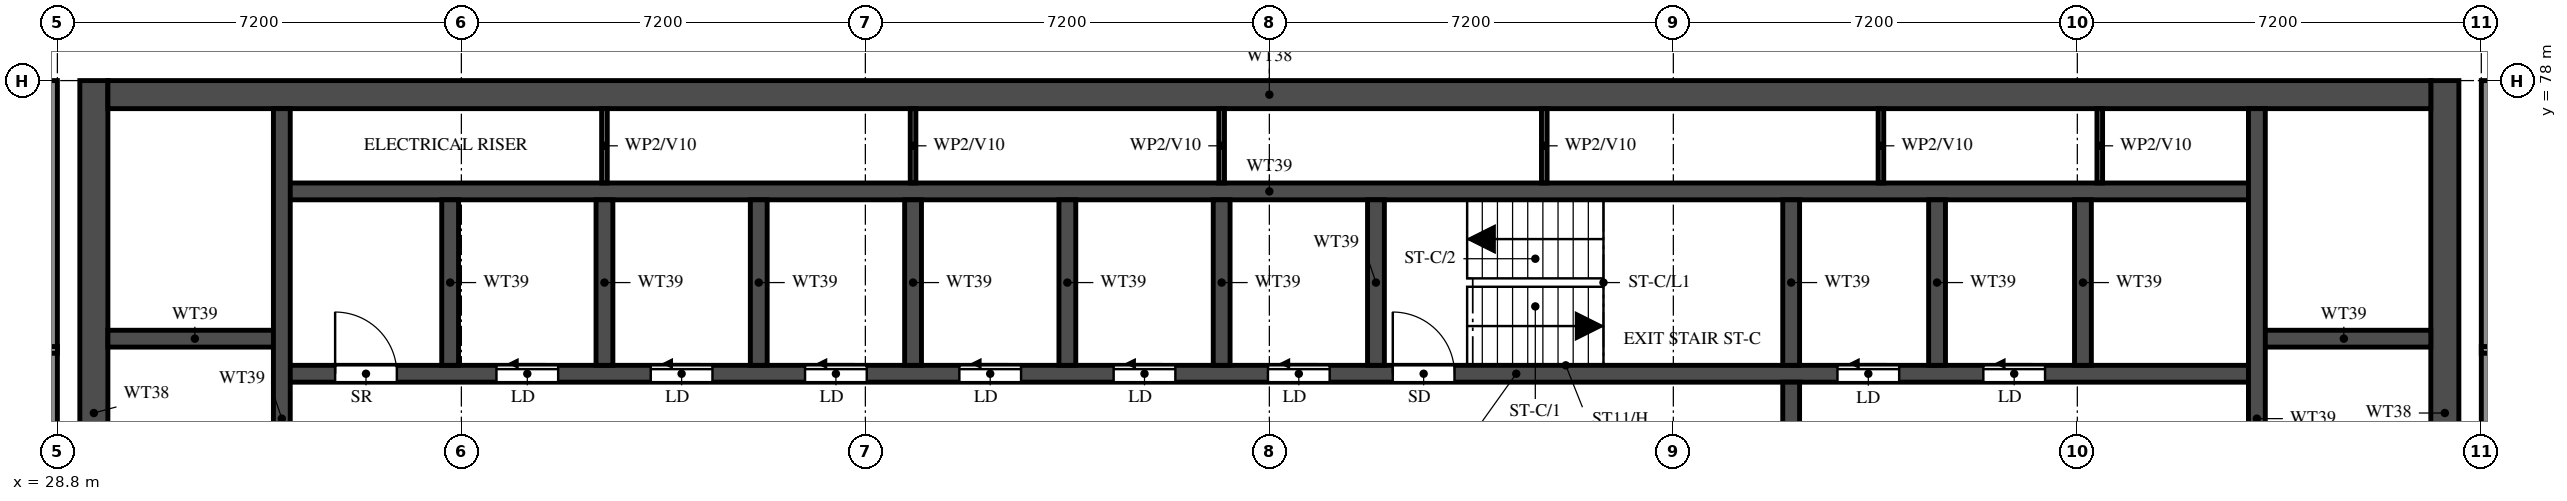
"""IFC4 building model, lengths in metres.
Left out: names, types, materials, properties, quantities, classifications, styles, units other than length and angle.
Written with IfcOpenShell. Run it as: python <this file> out.ifc"""

import sys

from ifc_helpers import new_model, si_unit, direction, frame, frame_2d, origin, place, context, subcontext, project, spatial, rectangle, extrude, element, fill, save


model = new_model("IFC4")
c1 = context("Model", 3, precision=1e-05, world=origin(), true_north=direction((0.0, 1.0)))
c2 = subcontext(c1, "Body", "Model", "MODEL_VIEW")
j1 = project(units=[si_unit("LENGTHUNIT", "METRE"), si_unit("PLANEANGLEUNIT", "RADIAN")], contexts=[c1])
p1 = place(None, origin())
s1 = spatial("IfcSite", under=j1, at=p1, CompositionType="ELEMENT")
p2 = place(p1, origin())
s2 = spatial("IfcBuilding", under=s1, at=p2, CompositionType="ELEMENT")
p3 = place(p2, frame((0.0, 0.0, 267.5)))
s3 = spatial("IfcBuildingStorey", under=s2, at=p3, CompositionType="ELEMENT", Elevation=267.5)
for number, where, z_axis, x_axis in (
    (1, (29.45, 66.15, 0.0), (0.0, 0.0, 1.0), (0.0, 1.0, 0.0)),
    (2, (71.35, 66.15, 0.0), (0.0, 0.0, 1.0), (0.0, 1.0, 0.0)),
):
    element("IfcWall", number, at=place(p3, frame(where, z_axis=z_axis, x_axis=x_axis)), inside=s3, PredefinedType="SHEAR", context=c2, shape_type="SweptSolid", body=[
        extrude(rectangle(XDim=11.85, YDim=0.5, at=frame_2d((5.925, 0.0))), origin(), (0.0, 0.0, 1.0), 3.099),
    ])
p4 = place(p3, frame((29.7, 77.75, 0.0), z_axis=(0.0, 0.0, 1.0), x_axis=(1.0, 0.0, 0.0)))
e3 = element("IfcWall", 3, at=p4, inside=s3, PredefinedType="SHEAR", context=c2, shape_type="SweptSolid", body=[
    extrude(rectangle(XDim=41.4, YDim=0.5, at=frame_2d((20.7, 0.0))), origin(), (0.0, 0.0, 1.0), 3.099),
])
p5 = place(p3, frame((32.8, 72.775, 0.0), z_axis=(0.0, 0.0, 1.0), x_axis=(1.0, 0.0, 0.0)))
e4 = element("IfcWall", 4, at=p5, inside=s3, PredefinedType="SHEAR", context=c2, shape_type="SweptSolid", body=[
    extrude(rectangle(XDim=35.2, YDim=0.3, at=frame_2d((17.6, 0.0))), origin(), (0.0, 0.0, 1.0), 3.099),
])
p6 = place(p5, frame((19.8, 0.0, 0.0)))
e5 = element("IfcOpeningElement", 5, at=p6, cuts=e4, PredefinedType="OPENING", context=c2, shape_type="SweptSolid", body=[
    extrude(rectangle(XDim=1.1, YDim=2.1, at=frame_2d((0.55, 1.05))), frame((0.0, 0.16, 0.0), z_axis=(0.0, -1.0, 0.0), x_axis=(1.0, 0.0, 0.0)), (0.0, 0.0, 1.0), 0.32),
])
p7 = place(p5, frame((27.725, 0.0, 0.0)))
e6 = element("IfcOpeningElement", 6, at=p7, cuts=e4, PredefinedType="OPENING", context=c2, shape_type="SweptSolid", body=[
    extrude(rectangle(XDim=1.1, YDim=2.1, at=frame_2d((0.55, 1.05))), frame((0.0, 0.16, 0.0), z_axis=(0.0, -1.0, 0.0), x_axis=(1.0, 0.0, 0.0)), (0.0, 0.0, 1.0), 0.32),
])
p8 = place(p5, frame((30.325, 0.0, 0.0)))
e7 = element("IfcOpeningElement", 7, at=p8, cuts=e4, PredefinedType="OPENING", context=c2, shape_type="SweptSolid", body=[
    extrude(rectangle(XDim=1.1, YDim=2.1, at=frame_2d((0.55, 1.05))), frame((0.0, 0.16, 0.0), z_axis=(0.0, -1.0, 0.0), x_axis=(1.0, 0.0, 0.0)), (0.0, 0.0, 1.0), 0.32),
])
p9 = place(p5, frame((3.825, 0.0, 0.0)))
e8 = element("IfcOpeningElement", 8, at=p9, cuts=e4, PredefinedType="OPENING", context=c2, shape_type="SweptSolid", body=[
    extrude(rectangle(XDim=1.1, YDim=2.1, at=frame_2d((0.55, 1.05))), frame((0.0, 0.16, 0.0), z_axis=(0.0, -1.0, 0.0), x_axis=(1.0, 0.0, 0.0)), (0.0, 0.0, 1.0), 0.32),
])
p10 = place(p5, frame((6.575, 0.0, 0.0)))
e9 = element("IfcOpeningElement", 9, at=p10, cuts=e4, PredefinedType="OPENING", context=c2, shape_type="SweptSolid", body=[
    extrude(rectangle(XDim=1.1, YDim=2.1, at=frame_2d((0.55, 1.05))), frame((0.0, 0.16, 0.0), z_axis=(0.0, -1.0, 0.0), x_axis=(1.0, 0.0, 0.0)), (0.0, 0.0, 1.0), 0.32),
])
p11 = place(p5, frame((9.325, 0.0, 0.0)))
e10 = element("IfcOpeningElement", 10, at=p11, cuts=e4, PredefinedType="OPENING", context=c2, shape_type="SweptSolid", body=[
    extrude(rectangle(XDim=1.1, YDim=2.1, at=frame_2d((0.55, 1.05))), frame((0.0, 0.16, 0.0), z_axis=(0.0, -1.0, 0.0), x_axis=(1.0, 0.0, 0.0)), (0.0, 0.0, 1.0), 0.32),
])
p12 = place(p5, frame((12.075, 0.0, 0.0)))
e11 = element("IfcOpeningElement", 11, at=p12, cuts=e4, PredefinedType="OPENING", context=c2, shape_type="SweptSolid", body=[
    extrude(rectangle(XDim=1.1, YDim=2.1, at=frame_2d((0.55, 1.05))), frame((0.0, 0.16, 0.0), z_axis=(0.0, -1.0, 0.0), x_axis=(1.0, 0.0, 0.0)), (0.0, 0.0, 1.0), 0.32),
])
p13 = place(p5, frame((14.825, 0.0, 0.0)))
e12 = element("IfcOpeningElement", 12, at=p13, cuts=e4, PredefinedType="OPENING", context=c2, shape_type="SweptSolid", body=[
    extrude(rectangle(XDim=1.1, YDim=2.1, at=frame_2d((0.55, 1.05))), frame((0.0, 0.16, 0.0), z_axis=(0.0, -1.0, 0.0), x_axis=(1.0, 0.0, 0.0)), (0.0, 0.0, 1.0), 0.32),
])
p14 = place(p5, frame((17.575, 0.0, 0.0)))
e13 = element("IfcOpeningElement", 13, at=p14, cuts=e4, PredefinedType="OPENING", context=c2, shape_type="SweptSolid", body=[
    extrude(rectangle(XDim=1.1, YDim=2.1, at=frame_2d((0.55, 1.05))), frame((0.0, 0.16, 0.0), z_axis=(0.0, -1.0, 0.0), x_axis=(1.0, 0.0, 0.0)), (0.0, 0.0, 1.0), 0.32),
])
p15 = place(p5, frame((0.95, 0.0, 0.0)))
e14 = element("IfcOpeningElement", 14, at=p15, cuts=e4, PredefinedType="OPENING", context=c2, shape_type="SweptSolid", body=[
    extrude(rectangle(XDim=1.1, YDim=2.1, at=frame_2d((0.55, 1.05))), frame((0.0, 0.16, 0.0), z_axis=(0.0, -1.0, 0.0), x_axis=(1.0, 0.0, 0.0)), (0.0, 0.0, 1.0), 0.32),
])
p16 = place(p3, frame((32.8, 76.025, 0.0), z_axis=(0.0, 0.0, 1.0), x_axis=(1.0, 0.0, 0.0)))
e15 = element("IfcWall", 15, at=p16, inside=s3, PredefinedType="SHEAR", context=c2, shape_type="SweptSolid", body=[
    extrude(rectangle(XDim=35.2, YDim=0.3, at=frame_2d((17.6, 0.0))), origin(), (0.0, 0.0, 1.0), 3.099),
])
for number, where, z_axis, x_axis in (
    (16, (29.7, 73.4, 0.0), (0.0, 0.0, 1.0), (1.0, 0.0, 0.0)),
    (17, (68.0, 73.4, 0.0), (0.0, 0.0, 1.0), (1.0, 0.0, 0.0)),
):
    element("IfcWall", number, at=place(p3, frame(where, z_axis=z_axis, x_axis=x_axis)), inside=s3, PredefinedType="SHEAR", context=c2, shape_type="SweptSolid", body=[
        extrude(rectangle(XDim=3.1, YDim=0.3, at=frame_2d((1.55, 0.0))), origin(), (0.0, 0.0, 1.0), 3.099),
    ])
p17 = place(p3, frame((32.8, 66.45, 0.0), z_axis=(0.0, 0.0, 1.0), x_axis=(0.0, 1.0, 0.0)))
e18 = element("IfcWall", 18, at=p17, inside=s3, PredefinedType="SHEAR", context=c2, shape_type="SweptSolid", body=[
    extrude(rectangle(XDim=11.05, YDim=0.3, at=frame_2d((5.525, 0.0))), origin(), (0.0, 0.0, 1.0), 3.099),
])
p18 = place(p3, frame((68.0, 66.45, 0.0), z_axis=(0.0, 0.0, 1.0), x_axis=(0.0, 1.0, 0.0)))
e19 = element("IfcWall", 19, at=p18, inside=s3, PredefinedType="SHEAR", context=c2, shape_type="SweptSolid", body=[
    extrude(rectangle(XDim=11.05, YDim=0.3, at=frame_2d((5.525, 0.0))), origin(), (0.0, 0.0, 1.0), 3.099),
])
p19 = place(p18, frame((0.15, 0.0, 0.0)))
e20 = element("IfcOpeningElement", 20, at=p19, cuts=e19, PredefinedType="OPENING", context=c2, shape_type="SweptSolid", body=[
    extrude(rectangle(XDim=1.1, YDim=2.1, at=frame_2d((0.55, 1.05))), frame((0.0, 0.16, 0.0), z_axis=(0.0, -1.0, 0.0), x_axis=(1.0, 0.0, 0.0)), (0.0, 0.0, 1.0), 0.32),
])
p20 = place(p3, frame((59.7, 66.45, 0.0), z_axis=(0.0, 0.0, 1.0), x_axis=(0.0, 1.0, 0.0)))
e21 = element("IfcWall", 21, at=p20, inside=s3, PredefinedType="SHEAR", context=c2, shape_type="SweptSolid", body=[
    extrude(rectangle(XDim=6.175, YDim=0.3, at=frame_2d((3.087, 0.0))), origin(), (0.0, 0.0, 1.0), 3.099),
])
p21 = place(p20, frame((3.85, 0.0, 0.0)))
e22 = element("IfcOpeningElement", 22, at=p21, cuts=e21, PredefinedType="OPENING", context=c2, shape_type="SweptSolid", body=[
    extrude(rectangle(XDim=1.2, YDim=2.1, at=frame_2d((0.6, 1.05))), frame((0.0, 0.16, 0.0), z_axis=(0.0, -1.0, 0.0), x_axis=(1.0, 0.0, 0.0)), (0.0, 0.0, 1.0), 0.32),
])
for number, where, z_axis, x_axis in (
    (23, (59.7, 72.925, 0.0), (0.0, 0.0, 1.0), (0.0, 1.0, 0.0)),
    (24, (35.8, 72.925, 0.0), (0.0, 0.0, 1.0), (0.0, 1.0, 0.0)),
    (25, (38.55, 72.925, 0.0), (0.0, 0.0, 1.0), (0.0, 1.0, 0.0)),
    (26, (41.3, 72.925, 0.0), (0.0, 0.0, 1.0), (0.0, 1.0, 0.0)),
    (27, (44.05, 72.925, 0.0), (0.0, 0.0, 1.0), (0.0, 1.0, 0.0)),
    (28, (46.8, 72.925, 0.0), (0.0, 0.0, 1.0), (0.0, 1.0, 0.0)),
    (29, (49.55, 72.925, 0.0), (0.0, 0.0, 1.0), (0.0, 1.0, 0.0)),
    (30, (52.3, 72.925, 0.0), (0.0, 0.0, 1.0), (0.0, 1.0, 0.0)),
    (31, (62.3, 72.925, 0.0), (0.0, 0.0, 1.0), (0.0, 1.0, 0.0)),
    (32, (64.9, 72.925, 0.0), (0.0, 0.0, 1.0), (0.0, 1.0, 0.0)),
):
    element("IfcWall", number, at=place(p3, frame(where, z_axis=z_axis, x_axis=x_axis)), inside=s3, PredefinedType="SHEAR", context=c2, shape_type="SweptSolid", body=[
        extrude(rectangle(XDim=2.95, YDim=0.3, at=frame_2d((1.475, 0.0))), origin(), (0.0, 0.0, 1.0), 3.099),
    ])
for number, where, z_axis, x_axis in (
    (33, (38.55, 76.175, 0.0), (0.0, 0.0, 1.0), (0.0, 1.0, 0.0)),
    (34, (44.05, 76.175, 0.0), (0.0, 0.0, 1.0), (0.0, 1.0, 0.0)),
    (35, (49.55, 76.175, 0.0), (0.0, 0.0, 1.0), (0.0, 1.0, 0.0)),
    (36, (55.3, 76.175, 0.0), (0.0, 0.0, 1.0), (0.0, 1.0, 0.0)),
    (37, (61.3, 76.175, 0.0), (0.0, 0.0, 1.0), (0.0, 1.0, 0.0)),
    (38, (65.2, 76.175, 0.0), (0.0, 0.0, 1.0), (0.0, 1.0, 0.0)),
):
    element("IfcWall", number, at=place(p3, frame(where, z_axis=z_axis, x_axis=x_axis)), inside=s3, PredefinedType="PARTITIONING", context=c2, shape_type="SweptSolid", body=[
        extrude(rectangle(XDim=1.325, YDim=0.1, at=frame_2d((0.663, 0.0))), origin(), (0.0, 0.0, 1.0), 3.099),
    ])
for number, where, z_axis, x_axis in (
    (39, (28.7, 62.4, 0.0), (0.0, 0.0, 1.0), (0.0, 1.0, 0.0)),
    (40, (72.1, 62.4, 0.0), (0.0, 0.0, 1.0), (0.0, 1.0, 0.0)),
):
    element("IfcWall", number, at=place(p3, frame(where, z_axis=z_axis, x_axis=x_axis)), inside=s3, PredefinedType="SOLIDWALL", context=c2, shape_type="SweptSolid", body=[
        extrude(rectangle(XDim=15.6, YDim=0.2, at=frame_2d((7.8, 0.0))), origin(), (0.0, 0.0, 1.0), 3.099),
    ])
p22 = place(p3, frame((18.525, 73.2, 0.0), z_axis=(0.0, 0.0, 1.0), x_axis=(1.0, 0.0, 0.0)))
e41 = element("IfcWall", 41, at=p22, inside=s3, PredefinedType="PARTITIONING", context=c2, shape_type="SweptSolid", body=[
    extrude(rectangle(XDim=10.275, YDim=0.12, at=frame_2d((5.138, 0.0))), origin(), (0.0, 0.0, 1.0), 3.099),
])
p23 = place(p22, frame((5.275, 0.0, 0.0)))
e42 = element("IfcOpeningElement", 42, at=p23, cuts=e41, PredefinedType="OPENING", context=c2, shape_type="SweptSolid", body=[
    extrude(rectangle(XDim=0.9, YDim=2.1, at=frame_2d((0.45, 1.05))), frame((0.0, 0.07, 0.0), z_axis=(0.0, -1.0, 0.0), x_axis=(1.0, 0.0, 0.0)), (0.0, 0.0, 1.0), 0.14),
])
p24 = place(p3, frame((72.0, 73.2, 0.0), z_axis=(0.0, 0.0, 1.0), x_axis=(1.0, 0.0, 0.0)))
e43 = element("IfcWall", 43, at=p24, inside=s3, PredefinedType="PARTITIONING", context=c2, shape_type="SweptSolid", body=[
    extrude(rectangle(XDim=10.275, YDim=0.12, at=frame_2d((5.137, 0.0))), origin(), (0.0, 0.0, 1.0), 3.099),
])
p25 = place(p24, frame((4.1, 0.0, 0.0)))
e44 = element("IfcOpeningElement", 44, at=p25, cuts=e43, PredefinedType="OPENING", context=c2, shape_type="SweptSolid", body=[
    extrude(rectangle(XDim=0.9, YDim=2.1, at=frame_2d((0.45, 1.05))), frame((0.0, 0.07, 0.0), z_axis=(0.0, -1.0, 0.0), x_axis=(1.0, 0.0, 0.0)), (0.0, 0.0, 1.0), 0.14),
])
p26 = place(p6, origin())
e45 = element("IfcDoor", 45, at=p26, inside=s3, OperationType="SINGLE_SWING_LEFT", PredefinedType="DOOR", context=c2, shape_type="SweptSolid", body=[
    extrude(rectangle(XDim=1.1, YDim=2.1, at=frame_2d((0.55, 1.05))), frame((0.0, 0.025, 0.0), z_axis=(0.0, -1.0, 0.0), x_axis=(1.0, 0.0, 0.0)), (0.0, 0.0, 1.0), 0.05),
])
fill(e5, e45)
p27 = place(p7, origin())
e46 = element("IfcDoor", 46, at=p27, inside=s3, OperationType="SLIDING_TO_LEFT", PredefinedType="DOOR", context=c2, shape_type="SweptSolid", body=[
    extrude(rectangle(XDim=1.1, YDim=2.1, at=frame_2d((0.55, 1.05))), frame((0.0, 0.025, 0.0), z_axis=(0.0, -1.0, 0.0), x_axis=(1.0, 0.0, 0.0)), (0.0, 0.0, 1.0), 0.05),
])
fill(e6, e46)
p28 = place(p8, origin())
e47 = element("IfcDoor", 47, at=p28, inside=s3, OperationType="SLIDING_TO_LEFT", PredefinedType="DOOR", context=c2, shape_type="SweptSolid", body=[
    extrude(rectangle(XDim=1.1, YDim=2.1, at=frame_2d((0.55, 1.05))), frame((0.0, 0.025, 0.0), z_axis=(0.0, -1.0, 0.0), x_axis=(1.0, 0.0, 0.0)), (0.0, 0.0, 1.0), 0.05),
])
fill(e7, e47)
p29 = place(p9, origin())
e48 = element("IfcDoor", 48, at=p29, inside=s3, OperationType="SLIDING_TO_LEFT", PredefinedType="DOOR", context=c2, shape_type="SweptSolid", body=[
    extrude(rectangle(XDim=1.1, YDim=2.1, at=frame_2d((0.55, 1.05))), frame((0.0, 0.025, 0.0), z_axis=(0.0, -1.0, 0.0), x_axis=(1.0, 0.0, 0.0)), (0.0, 0.0, 1.0), 0.05),
])
fill(e8, e48)
p30 = place(p10, origin())
e49 = element("IfcDoor", 49, at=p30, inside=s3, OperationType="SLIDING_TO_LEFT", PredefinedType="DOOR", context=c2, shape_type="SweptSolid", body=[
    extrude(rectangle(XDim=1.1, YDim=2.1, at=frame_2d((0.55, 1.05))), frame((0.0, 0.025, 0.0), z_axis=(0.0, -1.0, 0.0), x_axis=(1.0, 0.0, 0.0)), (0.0, 0.0, 1.0), 0.05),
])
fill(e9, e49)
p31 = place(p11, origin())
e50 = element("IfcDoor", 50, at=p31, inside=s3, OperationType="SLIDING_TO_LEFT", PredefinedType="DOOR", context=c2, shape_type="SweptSolid", body=[
    extrude(rectangle(XDim=1.1, YDim=2.1, at=frame_2d((0.55, 1.05))), frame((0.0, 0.025, 0.0), z_axis=(0.0, -1.0, 0.0), x_axis=(1.0, 0.0, 0.0)), (0.0, 0.0, 1.0), 0.05),
])
fill(e10, e50)
p32 = place(p12, origin())
e51 = element("IfcDoor", 51, at=p32, inside=s3, OperationType="SLIDING_TO_LEFT", PredefinedType="DOOR", context=c2, shape_type="SweptSolid", body=[
    extrude(rectangle(XDim=1.1, YDim=2.1, at=frame_2d((0.55, 1.05))), frame((0.0, 0.025, 0.0), z_axis=(0.0, -1.0, 0.0), x_axis=(1.0, 0.0, 0.0)), (0.0, 0.0, 1.0), 0.05),
])
fill(e11, e51)
p33 = place(p13, origin())
e52 = element("IfcDoor", 52, at=p33, inside=s3, OperationType="SLIDING_TO_LEFT", PredefinedType="DOOR", context=c2, shape_type="SweptSolid", body=[
    extrude(rectangle(XDim=1.1, YDim=2.1, at=frame_2d((0.55, 1.05))), frame((0.0, 0.025, 0.0), z_axis=(0.0, -1.0, 0.0), x_axis=(1.0, 0.0, 0.0)), (0.0, 0.0, 1.0), 0.05),
])
fill(e12, e52)
p34 = place(p14, origin())
e53 = element("IfcDoor", 53, at=p34, inside=s3, OperationType="SLIDING_TO_LEFT", PredefinedType="DOOR", context=c2, shape_type="SweptSolid", body=[
    extrude(rectangle(XDim=1.1, YDim=2.1, at=frame_2d((0.55, 1.05))), frame((0.0, 0.025, 0.0), z_axis=(0.0, -1.0, 0.0), x_axis=(1.0, 0.0, 0.0)), (0.0, 0.0, 1.0), 0.05),
])
fill(e13, e53)
p35 = place(p15, origin())
e54 = element("IfcDoor", 54, at=p35, inside=s3, OperationType="SINGLE_SWING_LEFT", PredefinedType="DOOR", context=c2, shape_type="SweptSolid", body=[
    extrude(rectangle(XDim=1.1, YDim=2.1, at=frame_2d((0.55, 1.05))), frame((0.0, 0.025, 0.0), z_axis=(0.0, -1.0, 0.0), x_axis=(1.0, 0.0, 0.0)), (0.0, 0.0, 1.0), 0.05),
])
fill(e14, e54)
save(model, sys.argv[1])
